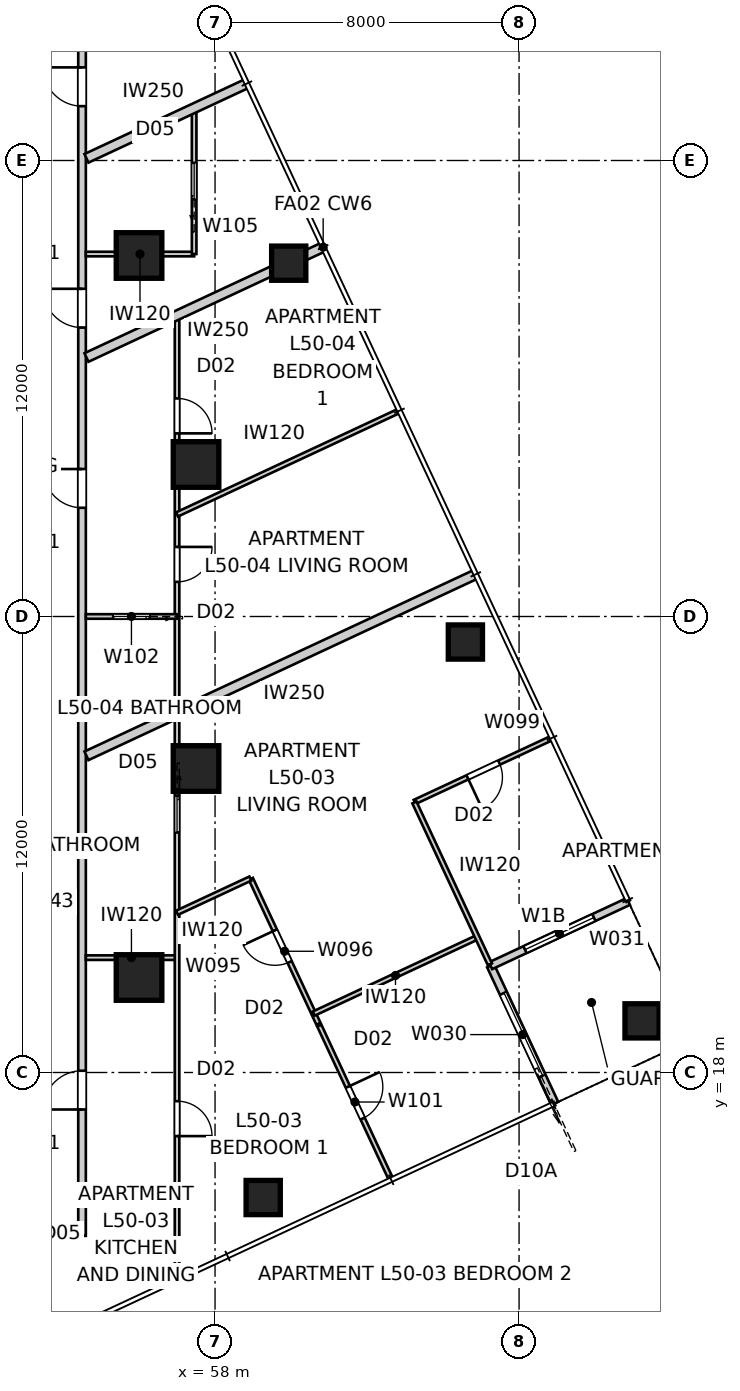
"""IFC4 building model, lengths in metres.
Left out: names, types, materials, properties, quantities, classifications, styles, units other than length and angle.
Written with IfcOpenShell. Run it as: python <this file> out.ifc"""

import sys

from ifc_helpers import new_model, si_unit, direction, frame, frame_2d, origin, origin_2d, place, context, subcontext, project, spatial, rectangle, extrude, element, fill, save


model = new_model("IFC4")
c1 = context("Model", 3, precision=1e-05, world=origin(), true_north=direction((0.0, 1.0)))
c2 = subcontext(c1, "Body", "Model", "MODEL_VIEW")
j1 = project(units=[si_unit("LENGTHUNIT", "METRE"), si_unit("PLANEANGLEUNIT", "RADIAN")], contexts=[c1])
p1 = place(None, origin())
s1 = spatial("IfcSite", under=j1, at=p1, CompositionType="ELEMENT")
p2 = place(p1, origin())
s2 = spatial("IfcBuilding", under=s1, at=p2, CompositionType="ELEMENT")
p3 = place(p2, frame((0.0, 0.0, 182.8)))
s3 = spatial("IfcBuildingStorey", under=s2, at=p3, CompositionType="ELEMENT", Elevation=182.8)
for number, where, z_axis, x_axis in (
    (1, (59.267, 14.71, 0.0), (0.0, 0.0, 1.0), (1.0, 0.0, 0.0)),
    (2, (69.236, 19.359, 0.0), (0.0, 0.0, 1.0), (1.0, 0.0, 0.0)),
    (3, (64.588, 29.328, 0.0), (0.0, 0.0, 1.0), (1.0, 0.0, 0.0)),
    (4, (59.939, 39.298, 0.0), (0.0, 0.0, 1.0), (1.0, 0.0, 0.0)),
):
    element("IfcColumn", number, at=place(p3, frame(where, z_axis=z_axis, x_axis=x_axis)), inside=s3, PredefinedType="COLUMN", context=c2, shape_type="SweptSolid", body=[
        extrude(rectangle(XDim=0.9, YDim=0.9, at=origin_2d()), origin(), (0.0, 0.0, 1.0), 3.4),
    ])
for number, where, z_axis, x_axis in (
    (5, (57.5, 26.0, 0.0), (0.0, 0.0, 1.0), (1.0, 0.0, 0.0)),
    (6, (57.5, 34.0, 0.0), (0.0, 0.0, 1.0), (1.0, 0.0, 0.0)),
    (7, (56.0, 39.5, 0.0), (0.0, 0.0, 1.0), (1.0, 0.0, 0.0)),
    (8, (56.0, 20.5, 0.0), (0.0, 0.0, 1.0), (1.0, 0.0, 0.0)),
):
    element("IfcColumn", number, at=place(p3, frame(where, z_axis=z_axis, x_axis=x_axis)), inside=s3, PredefinedType="COLUMN", context=c2, shape_type="SweptSolid", body=[
        extrude(rectangle(XDim=1.2, YDim=1.2, at=origin_2d()), origin(), (0.0, 0.0, 1.0), 3.4),
    ])
p4 = place(p3, frame((66.94, 17.185, 0.0), z_axis=(0.0, 0.0, 1.0), x_axis=(-0.422658246362, 0.906289140828, 0.0)))
e9 = element("IfcWall", 9, at=p4, inside=s3, PredefinedType="SOLIDWALL", context=c2, shape_type="SweptSolid", body=[
    extrude(rectangle(XDim=4.0, YDim=0.2, at=frame_2d((2.0, 0.0))), origin(), (0.0, 0.0, 1.0), 3.25),
])
p5 = place(p4, frame((0.8, 0.0, 0.0)))
e10 = element("IfcOpeningElement", 10, at=p5, cuts=e9, PredefinedType="OPENING", context=c2, shape_type="SweptSolid", body=[
    extrude(rectangle(XDim=2.4, YDim=2.1, at=frame_2d((1.2, 1.05))), frame((0.0, 0.11, 0.0), z_axis=(0.0, -1.0, 0.0), x_axis=(1.0, 0.0, 0.0)), (0.0, 0.0, 1.0), 0.22),
])
p6 = place(p3, frame((65.25, 20.81, 0.0), z_axis=(0.0, 0.0, 1.0), x_axis=(0.906289140828, 0.422658246362, 0.0)))
e11 = element("IfcWall", 11, at=p6, inside=s3, PredefinedType="SOLIDWALL", context=c2, shape_type="SweptSolid", body=[
    extrude(rectangle(XDim=4.0, YDim=0.2, at=frame_2d((2.0, 0.0))), origin(), (0.0, 0.0, 1.0), 3.25),
])
p7 = place(p6, frame((1.0, 0.0, 0.45)))
e12 = element("IfcOpeningElement", 12, at=p7, cuts=e11, PredefinedType="OPENING", context=c2, shape_type="SweptSolid", body=[
    extrude(rectangle(XDim=2.0, YDim=1.8, at=frame_2d((1.0, 0.9))), frame((0.0, 0.11, 0.0), z_axis=(0.0, -1.0, 0.0), x_axis=(1.0, 0.0, 0.0)), (0.0, 0.0, 1.0), 0.22),
])
p8 = place(p3, frame((49.242, 13.7, 0.0), z_axis=(0.0, 0.0, 1.0), x_axis=(1.0, 0.0, 0.0)))
e13 = element("IfcWall", 13, at=p8, inside=s3, PredefinedType="PARTITIONING", context=c2, shape_type="SweptSolid", body=[
    extrude(rectangle(XDim=5.258, YDim=0.2, at=frame_2d((2.629, 0.0))), origin(), (0.0, 0.0, 1.0), 3.25),
])
p9 = place(p3, frame((54.5, 13.7, 0.0), z_axis=(0.0, 0.0, 1.0), x_axis=(0.0, 1.0, 0.0)))
e14 = element("IfcWall", 14, at=p9, inside=s3, PredefinedType="PARTITIONING", context=c2, shape_type="SweptSolid", body=[
    extrude(rectangle(XDim=32.6, YDim=0.2, at=frame_2d((16.3, 0.0))), origin(), (0.0, 0.0, 1.0), 3.25),
])
p10 = place(p9, frame((3.326, 0.0, 0.0)))
e15 = element("IfcOpeningElement", 15, at=p10, cuts=e14, PredefinedType="OPENING", context=c2, shape_type="SweptSolid", body=[
    extrude(rectangle(XDim=1.02, YDim=2.34, at=frame_2d((0.51, 1.17))), frame((0.0, 0.11, 0.0), z_axis=(0.0, -1.0, 0.0), x_axis=(1.0, 0.0, 0.0)), (0.0, 0.0, 1.0), 0.22),
])
p11 = place(p9, frame((19.161, 0.0, 0.0)))
e16 = element("IfcOpeningElement", 16, at=p11, cuts=e14, PredefinedType="OPENING", context=c2, shape_type="SweptSolid", body=[
    extrude(rectangle(XDim=1.02, YDim=2.34, at=frame_2d((0.51, 1.17))), frame((0.0, 0.11, 0.0), z_axis=(0.0, -1.0, 0.0), x_axis=(1.0, 0.0, 0.0)), (0.0, 0.0, 1.0), 0.22),
])
p12 = place(p9, frame((29.73, 0.0, 0.0)))
e17 = element("IfcOpeningElement", 17, at=p12, cuts=e14, PredefinedType="OPENING", context=c2, shape_type="SweptSolid", body=[
    extrude(rectangle(XDim=1.02, YDim=2.34, at=frame_2d((0.51, 1.17))), frame((0.0, 0.11, 0.0), z_axis=(0.0, -1.0, 0.0), x_axis=(1.0, 0.0, 0.0)), (0.0, 0.0, 1.0), 0.22),
])
p13 = place(p9, frame((23.904, 0.0, 0.0)))
e18 = element("IfcOpeningElement", 18, at=p13, cuts=e14, PredefinedType="OPENING", context=c2, shape_type="SweptSolid", body=[
    extrude(rectangle(XDim=1.02, YDim=2.34, at=frame_2d((0.51, 1.17))), frame((0.0, 0.11, 0.0), z_axis=(0.0, -1.0, 0.0), x_axis=(1.0, 0.0, 0.0)), (0.0, 0.0, 1.0), 0.22),
])
p14 = place(p3, frame((64.86, 31.11, 0.0), z_axis=(0.0, 0.0, 1.0), x_axis=(-0.906306714884, -0.422620560972, 0.0)))
e19 = element("IfcWall", 19, at=p14, inside=s3, PredefinedType="PARTITIONING", context=c2, shape_type="SweptSolid", body=[
    extrude(rectangle(XDim=11.302, YDim=0.25, at=frame_2d((5.651, 0.0))), origin(), (0.0, 0.0, 1.0), 3.25),
])
p15 = place(p3, frame((60.845, 39.72, 0.0), z_axis=(0.0, 0.0, 1.0), x_axis=(-0.90631378723, -0.422605394046, 0.0)))
e20 = element("IfcWall", 20, at=p15, inside=s3, PredefinedType="PARTITIONING", context=c2, shape_type="SweptSolid", body=[
    extrude(rectangle(XDim=6.872, YDim=0.25, at=frame_2d((3.436, 0.0))), origin(), (0.0, 0.0, 1.0), 3.25),
])
p16 = place(p3, frame((58.838, 44.025, 0.0), z_axis=(0.0, 0.0, 1.0), x_axis=(-0.906317010604, -0.422598481173, 0.0)))
e21 = element("IfcWall", 21, at=p16, inside=s3, PredefinedType="PARTITIONING", context=c2, shape_type="SweptSolid", body=[
    extrude(rectangle(XDim=4.657, YDim=0.25, at=frame_2d((2.329, 0.0))), origin(), (0.0, 0.0, 1.0), 3.25),
])
p17 = place(p3, frame((54.6, 21.023, 0.0), z_axis=(0.0, 0.0, 1.0), x_axis=(1.0, 0.0, 0.0)))
e22 = element("IfcWall", 22, at=p17, inside=s3, PredefinedType="PARTITIONING", context=c2, shape_type="SweptSolid", body=[
    extrude(rectangle(XDim=2.4, YDim=0.12, at=frame_2d((1.2, 0.0))), origin(), (0.0, 0.0, 1.0), 3.25),
])
p18 = place(p3, frame((57.0, 37.927, 0.0), z_axis=(0.0, 0.0, 1.0), x_axis=(0.0, -1.0, 0.0)))
e23 = element("IfcWall", 23, at=p18, inside=s3, PredefinedType="PARTITIONING", context=c2, shape_type="SweptSolid", body=[
    extrude(rectangle(XDim=25.333, YDim=0.12, at=frame_2d((12.667, 0.0))), origin(), (0.0, 0.0, 1.0), 2.55),
])
p19 = place(p18, frame((20.681, 0.0, 0.0)))
e24 = element("IfcOpeningElement", 24, at=p19, cuts=e23, PredefinedType="OPENING", context=c2, shape_type="SweptSolid", body=[
    extrude(rectangle(XDim=0.92, YDim=2.34, at=frame_2d((0.46, 1.17))), frame((0.0, 0.07, 0.0), z_axis=(0.0, -1.0, 0.0), x_axis=(1.0, 0.0, 0.0)), (0.0, 0.0, 1.0), 0.14),
])
p20 = place(p18, frame((2.188, 0.0, 0.0)))
e25 = element("IfcOpeningElement", 25, at=p20, cuts=e23, PredefinedType="OPENING", context=c2, shape_type="SweptSolid", body=[
    extrude(rectangle(XDim=0.92, YDim=2.34, at=frame_2d((0.46, 1.17))), frame((0.0, 0.07, 0.0), z_axis=(0.0, -1.0, 0.0), x_axis=(1.0, 0.0, 0.0)), (0.0, 0.0, 1.0), 0.14),
])
p21 = place(p18, frame((6.096, 0.0, 0.0)))
e26 = element("IfcOpeningElement", 26, at=p21, cuts=e23, PredefinedType="OPENING", context=c2, shape_type="SweptSolid", body=[
    extrude(rectangle(XDim=0.92, YDim=2.34, at=frame_2d((0.46, 1.17))), frame((0.0, 0.07, 0.0), z_axis=(0.0, -1.0, 0.0), x_axis=(1.0, 0.0, 0.0)), (0.0, 0.0, 1.0), 0.14),
])
p22 = place(p18, frame((12.65, 0.0, 0.0)))
e27 = element("IfcOpeningElement", 27, at=p22, cuts=e23, PredefinedType="OPENING", context=c2, shape_type="SweptSolid", body=[
    extrude(rectangle(XDim=0.96, YDim=2.1, at=frame_2d((0.48, 1.05))), frame((0.0, 0.07, 0.0), z_axis=(0.0, -1.0, 0.0), x_axis=(1.0, 0.0, 0.0)), (0.0, 0.0, 1.0), 0.14),
])
p23 = place(p3, frame((60.721, 19.282, 0.0), z_axis=(0.0, 0.0, 1.0), x_axis=(-0.422625167194, 0.906304566939, 0.0)))
e28 = element("IfcWall", 28, at=p23, inside=s3, PredefinedType="PARTITIONING", context=c2, shape_type="SweptSolid", body=[
    extrude(rectangle(XDim=4.211, YDim=0.12, at=frame_2d((2.105, 0.0))), origin(), (0.0, 0.0, 1.0), 3.25),
])
p24 = place(p23, frame((1.793, 0.0, 0.0)))
e29 = element("IfcOpeningElement", 29, at=p24, cuts=e28, PredefinedType="OPENING", context=c2, shape_type="SweptSolid", body=[
    extrude(rectangle(XDim=0.92, YDim=2.34, at=frame_2d((0.46, 1.17))), frame((0.0, 0.07, 0.0), z_axis=(0.0, -1.0, 0.0), x_axis=(1.0, 0.0, 0.0)), (0.0, 0.0, 1.0), 0.14),
])
p25 = place(p3, frame((58.928, 23.103, 0.0), z_axis=(0.0, 0.0, 1.0), x_axis=(-0.90630329877, -0.422627886727, 0.0)))
e30 = element("IfcWall", 30, at=p25, inside=s3, PredefinedType="PARTITIONING", context=c2, shape_type="SweptSolid", body=[
    extrude(rectangle(XDim=2.128, YDim=0.12, at=frame_2d((1.064, 0.0))), origin(), (0.0, 0.0, 1.0), 3.25),
])
p26 = place(p3, frame((64.901, 21.558, 0.0), z_axis=(0.0, 0.0, 1.0), x_axis=(-0.906315719442, -0.422601250227, 0.0)))
e31 = element("IfcWall", 31, at=p26, inside=s3, PredefinedType="PARTITIONING", context=c2, shape_type="SweptSolid", body=[
    extrude(rectangle(XDim=4.75, YDim=0.12, at=frame_2d((2.375, 0.0))), origin(), (0.0, 0.0, 1.0), 3.25),
])
p27 = place(p3, frame((66.831, 26.789, 0.0), z_axis=(0.0, 0.0, 1.0), x_axis=(-0.9062952203, -0.422645210149, 0.0)))
e32 = element("IfcWall", 32, at=p27, inside=s3, PredefinedType="PARTITIONING", context=c2, shape_type="SweptSolid", body=[
    extrude(rectangle(XDim=3.95, YDim=0.12, at=frame_2d((1.975, 0.0))), origin(), (0.0, 0.0, 1.0), 3.25),
])
p28 = place(p27, frame((1.495, 0.0, 0.0)))
e33 = element("IfcOpeningElement", 33, at=p28, cuts=e32, PredefinedType="OPENING", context=c2, shape_type="SweptSolid", body=[
    extrude(rectangle(XDim=0.92, YDim=2.34, at=frame_2d((0.46, 1.17))), frame((0.0, 0.07, 0.0), z_axis=(0.0, -1.0, 0.0), x_axis=(1.0, 0.0, 0.0)), (0.0, 0.0, 1.0), 0.14),
])
p29 = place(p3, frame((63.246, 25.106, 0.0), z_axis=(0.0, 0.0, 1.0), x_axis=(0.422632354456, -0.906301215362, 0.0)))
e34 = element("IfcWall", 34, at=p29, inside=s3, PredefinedType="PARTITIONING", context=c2, shape_type="SweptSolid", body=[
    extrude(rectangle(XDim=4.7, YDim=0.12, at=frame_2d((2.35, 0.0))), origin(), (0.0, 0.0, 1.0), 3.25),
])
p30 = place(p3, frame((60.744, 19.233, 0.0), z_axis=(0.0, 0.0, 1.0), x_axis=(0.42260518136, -0.906313886403, 0.0)))
e35 = element("IfcWall", 35, at=p30, inside=s3, PredefinedType="PARTITIONING", context=c2, shape_type="SweptSolid", body=[
    extrude(rectangle(XDim=4.435, YDim=0.12, at=frame_2d((2.218, 0.0))), origin(), (0.0, 0.0, 1.0), 3.25),
])
p31 = place(p30, frame((1.778, 0.0, 0.0)))
e36 = element("IfcOpeningElement", 36, at=p31, cuts=e35, PredefinedType="OPENING", context=c2, shape_type="SweptSolid", body=[
    extrude(rectangle(XDim=0.92, YDim=2.34, at=frame_2d((0.46, 1.17))), frame((0.0, 0.07, 0.0), z_axis=(0.0, -1.0, 0.0), x_axis=(1.0, 0.0, 0.0)), (0.0, 0.0, 1.0), 0.14),
])
p32 = place(p3, frame((57.0, 30.001, 0.0), z_axis=(0.0, 0.0, 1.0), x_axis=(-1.0, 0.0, 0.0)))
e37 = element("IfcWall", 37, at=p32, inside=s3, PredefinedType="PARTITIONING", context=c2, shape_type="SweptSolid", body=[
    extrude(rectangle(XDim=2.4, YDim=0.12, at=frame_2d((1.2, 0.0))), origin(), (0.0, 0.0, 1.0), 2.796),
])
p33 = place(p32, frame((0.72, 0.0, 0.0)))
e38 = element("IfcOpeningElement", 38, at=p33, cuts=e37, PredefinedType="OPENING", context=c2, shape_type="SweptSolid", body=[
    extrude(rectangle(XDim=0.96, YDim=2.1, at=frame_2d((0.48, 1.05))), frame((0.0, 0.07, 0.0), z_axis=(0.0, -1.0, 0.0), x_axis=(1.0, 0.0, 0.0)), (0.0, 0.0, 1.0), 0.14),
])
p34 = place(p3, frame((57.0, 32.686, 0.0), z_axis=(0.0, 0.0, 1.0), x_axis=(0.906305562553, 0.422623032129, 0.0)))
e39 = element("IfcWall", 39, at=p34, inside=s3, PredefinedType="PARTITIONING", context=c2, shape_type="SweptSolid", body=[
    extrude(rectangle(XDim=6.417, YDim=0.12, at=frame_2d((3.209, 0.0))), origin(), (0.0, 0.0, 1.0), 3.25),
])
p35 = place(p3, frame((54.6, 39.538, 0.0), z_axis=(0.0, 0.0, 1.0), x_axis=(1.0, 0.0, 0.0)))
e40 = element("IfcWall", 40, at=p35, inside=s3, PredefinedType="PARTITIONING", context=c2, shape_type="SweptSolid", body=[
    extrude(rectangle(XDim=2.85, YDim=0.12, at=frame_2d((1.425, 0.0))), origin(), (0.0, 0.0, 1.0), 3.25),
])
p36 = place(p3, frame((57.45, 39.538, 0.0), z_axis=(0.0, 0.0, 1.0), x_axis=(0.0, 1.0, 0.0)))
e41 = element("IfcWall", 41, at=p36, inside=s3, PredefinedType="PARTITIONING", context=c2, shape_type="SweptSolid", body=[
    extrude(rectangle(XDim=3.84, YDim=0.12, at=frame_2d((1.92, 0.0))), origin(), (0.0, 0.0, 1.0), 3.25),
])
p37 = place(p36, frame((1.44, 0.0, 0.0)))
e42 = element("IfcOpeningElement", 42, at=p37, cuts=e41, PredefinedType="OPENING", context=c2, shape_type="SweptSolid", body=[
    extrude(rectangle(XDim=0.96, YDim=2.1, at=frame_2d((0.48, 1.05))), frame((0.0, 0.07, 0.0), z_axis=(0.0, -1.0, 0.0), x_axis=(1.0, 0.0, 0.0)), (0.0, 0.0, 1.0), 0.14),
])
p38 = place(p5, origin())
e43 = element("IfcDoor", 43, at=p38, inside=s3, OperationType="SLIDING_TO_LEFT", PredefinedType="DOOR", context=c2, shape_type="SweptSolid", body=[
    extrude(rectangle(XDim=2.4, YDim=2.1, at=frame_2d((1.2, 1.05))), frame((0.0, 0.025, 0.0), z_axis=(0.0, -1.0, 0.0), x_axis=(1.0, 0.0, 0.0)), (0.0, 0.0, 1.0), 0.05),
])
fill(e10, e43)
p39 = place(p7, origin())
e44 = element("IfcWindow", 44, at=p39, inside=s3, PartitioningType="SINGLE_PANEL", PredefinedType="WINDOW", context=c2, shape_type="SweptSolid", body=[
    extrude(rectangle(XDim=2.0, YDim=1.8, at=frame_2d((1.0, 0.9))), frame((0.0, 0.03, 0.0), z_axis=(0.0, -1.0, 0.0), x_axis=(1.0, 0.0, 0.0)), (0.0, 0.0, 1.0), 0.06),
])
fill(e12, e44)
p40 = place(p10, origin())
e45 = element("IfcDoor", 45, at=p40, inside=s3, OperationType="SINGLE_SWING_LEFT", PredefinedType="DOOR", context=c2, shape_type="SweptSolid", body=[
    extrude(rectangle(XDim=1.02, YDim=2.34, at=frame_2d((0.51, 1.17))), frame((0.0, 0.025, 0.0), z_axis=(0.0, -1.0, 0.0), x_axis=(1.0, 0.0, 0.0)), (0.0, 0.0, 1.0), 0.05),
])
fill(e15, e45)
p41 = place(p11, origin())
e46 = element("IfcDoor", 46, at=p41, inside=s3, OperationType="SINGLE_SWING_RIGHT", PredefinedType="DOOR", context=c2, shape_type="SweptSolid", body=[
    extrude(rectangle(XDim=1.02, YDim=2.34, at=frame_2d((0.51, 1.17))), frame((0.0, 0.025, 0.0), z_axis=(0.0, -1.0, 0.0), x_axis=(1.0, 0.0, 0.0)), (0.0, 0.0, 1.0), 0.05),
])
fill(e16, e46)
p42 = place(p12, origin())
e47 = element("IfcDoor", 47, at=p42, inside=s3, OperationType="SINGLE_SWING_RIGHT", PredefinedType="DOOR", context=c2, shape_type="SweptSolid", body=[
    extrude(rectangle(XDim=1.02, YDim=2.34, at=frame_2d((0.51, 1.17))), frame((0.0, 0.025, 0.0), z_axis=(0.0, -1.0, 0.0), x_axis=(1.0, 0.0, 0.0)), (0.0, 0.0, 1.0), 0.05),
])
fill(e17, e47)
p43 = place(p13, origin())
e48 = element("IfcDoor", 48, at=p43, inside=s3, OperationType="SINGLE_SWING_RIGHT", PredefinedType="DOOR", context=c2, shape_type="SweptSolid", body=[
    extrude(rectangle(XDim=1.02, YDim=2.34, at=frame_2d((0.51, 1.17))), frame((0.0, 0.025, 0.0), z_axis=(0.0, -1.0, 0.0), x_axis=(1.0, 0.0, 0.0)), (0.0, 0.0, 1.0), 0.05),
])
fill(e18, e48)
p44 = place(p19, origin())
e49 = element("IfcDoor", 49, at=p44, inside=s3, OperationType="SINGLE_SWING_RIGHT", PredefinedType="DOOR", context=c2, shape_type="SweptSolid", body=[
    extrude(rectangle(XDim=0.92, YDim=2.34, at=frame_2d((0.46, 1.17))), frame((0.0, 0.025, 0.0), z_axis=(0.0, -1.0, 0.0), x_axis=(1.0, 0.0, 0.0)), (0.0, 0.0, 1.0), 0.05),
])
fill(e24, e49)
p45 = place(p20, origin())
e50 = element("IfcDoor", 50, at=p45, inside=s3, OperationType="SINGLE_SWING_RIGHT", PredefinedType="DOOR", context=c2, shape_type="SweptSolid", body=[
    extrude(rectangle(XDim=0.92, YDim=2.34, at=frame_2d((0.46, 1.17))), frame((0.0, 0.025, 0.0), z_axis=(0.0, -1.0, 0.0), x_axis=(1.0, 0.0, 0.0)), (0.0, 0.0, 1.0), 0.05),
])
fill(e25, e50)
p46 = place(p21, origin())
e51 = element("IfcDoor", 51, at=p46, inside=s3, OperationType="SINGLE_SWING_LEFT", PredefinedType="DOOR", context=c2, shape_type="SweptSolid", body=[
    extrude(rectangle(XDim=0.92, YDim=2.34, at=frame_2d((0.46, 1.17))), frame((0.0, 0.025, 0.0), z_axis=(0.0, -1.0, 0.0), x_axis=(1.0, 0.0, 0.0)), (0.0, 0.0, 1.0), 0.05),
])
fill(e26, e51)
p47 = place(p33, origin())
e52 = element("IfcDoor", 52, at=p47, inside=s3, OperationType="SLIDING_TO_LEFT", PredefinedType="DOOR", context=c2, shape_type="SweptSolid", body=[
    extrude(rectangle(XDim=0.96, YDim=2.1, at=frame_2d((0.48, 1.05))), frame((0.0, 0.025, 0.0), z_axis=(0.0, -1.0, 0.0), x_axis=(1.0, 0.0, 0.0)), (0.0, 0.0, 1.0), 0.05),
])
fill(e38, e52)
p48 = place(p37, origin())
e53 = element("IfcDoor", 53, at=p48, inside=s3, OperationType="SLIDING_TO_LEFT", PredefinedType="DOOR", context=c2, shape_type="SweptSolid", body=[
    extrude(rectangle(XDim=0.96, YDim=2.1, at=frame_2d((0.48, 1.05))), frame((0.0, 0.025, 0.0), z_axis=(0.0, -1.0, 0.0), x_axis=(1.0, 0.0, 0.0)), (0.0, 0.0, 1.0), 0.05),
])
fill(e42, e53)
p49 = place(p31, origin())
e54 = element("IfcDoor", 54, at=p49, inside=s3, OperationType="SINGLE_SWING_LEFT", PredefinedType="DOOR", context=c2, shape_type="SweptSolid", body=[
    extrude(rectangle(XDim=0.92, YDim=2.34, at=frame_2d((0.46, 1.17))), frame((0.0, 0.025, 0.0), z_axis=(0.0, -1.0, 0.0), x_axis=(1.0, 0.0, 0.0)), (0.0, 0.0, 1.0), 0.05),
])
fill(e36, e54)
p50 = place(p24, origin())
e55 = element("IfcDoor", 55, at=p50, inside=s3, OperationType="SINGLE_SWING_RIGHT", PredefinedType="DOOR", context=c2, shape_type="SweptSolid", body=[
    extrude(rectangle(XDim=0.92, YDim=2.34, at=frame_2d((0.46, 1.17))), frame((0.0, 0.025, 0.0), z_axis=(0.0, -1.0, 0.0), x_axis=(1.0, 0.0, 0.0)), (0.0, 0.0, 1.0), 0.05),
])
fill(e29, e55)
p51 = place(p22, origin())
e56 = element("IfcDoor", 56, at=p51, inside=s3, OperationType="SLIDING_TO_LEFT", PredefinedType="DOOR", context=c2, shape_type="SweptSolid", body=[
    extrude(rectangle(XDim=0.96, YDim=2.1, at=frame_2d((0.48, 1.05))), frame((0.0, 0.025, 0.0), z_axis=(0.0, -1.0, 0.0), x_axis=(1.0, 0.0, 0.0)), (0.0, 0.0, 1.0), 0.05),
])
fill(e27, e56)
p52 = place(p28, origin())
e57 = element("IfcDoor", 57, at=p52, inside=s3, OperationType="SINGLE_SWING_RIGHT", PredefinedType="DOOR", context=c2, shape_type="SweptSolid", body=[
    extrude(rectangle(XDim=0.92, YDim=2.34, at=frame_2d((0.46, 1.17))), frame((0.0, 0.025, 0.0), z_axis=(0.0, -1.0, 0.0), x_axis=(1.0, 0.0, 0.0)), (0.0, 0.0, 1.0), 0.05),
])
fill(e33, e57)
save(model, sys.argv[1])
